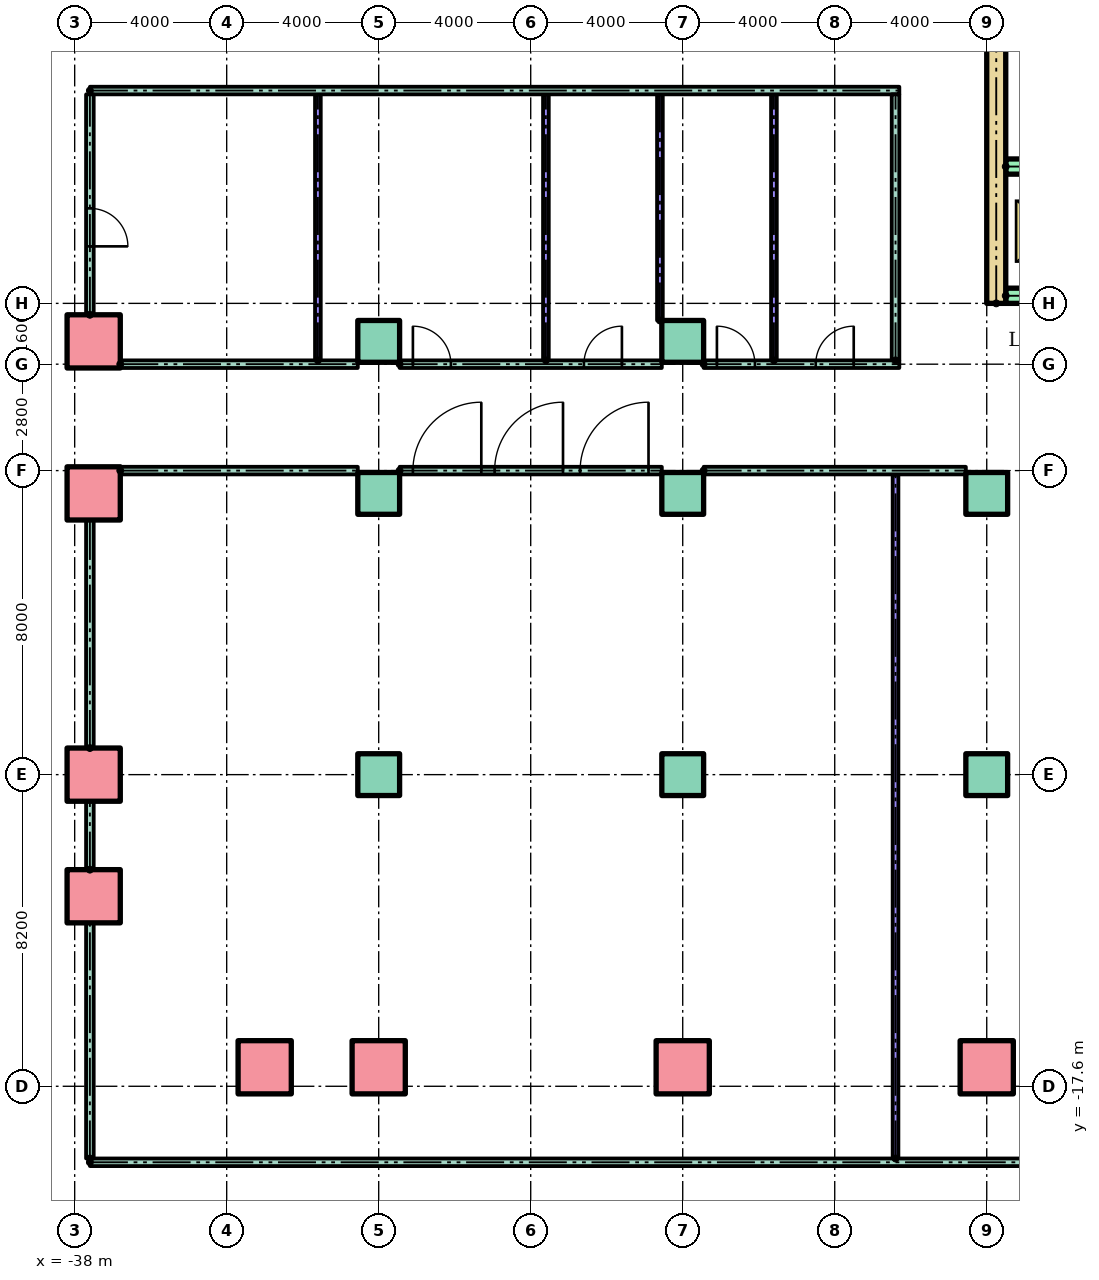
"""IFC4 building model, lengths in metres.
Left out: names, types, materials, properties, quantities, classifications, styles, units other than length and angle.
Written with IfcOpenShell. Run it as: python <this file> out.ifc"""

import sys

from ifc_helpers import new_model, si_unit, direction, frame, frame_2d, origin, origin_2d, place, context, subcontext, project, spatial, rectangle, hollow_rectangle, extrude, element, fill, save


model = new_model("IFC4")
c1 = context("Model", 3, precision=1e-05, world=origin(), true_north=direction((0.0, 1.0)))
c2 = subcontext(c1, "Body", "Model", "MODEL_VIEW")
j1 = project(units=[si_unit("LENGTHUNIT", "METRE"), si_unit("PLANEANGLEUNIT", "RADIAN")], contexts=[c1])
p1 = place(None, origin())
s1 = spatial("IfcSite", under=j1, at=p1, CompositionType="ELEMENT")
p2 = place(p1, origin())
s2 = spatial("IfcBuilding", under=s1, at=p2, CompositionType="ELEMENT")
p3 = place(p2, origin())
s3 = spatial("IfcBuildingStorey", under=s2, at=p3, CompositionType="ELEMENT", Elevation=0.0)
for number, where in (
    (1, (-33.0, -17.1, 0.0)),
    (2, (-30.0, -17.1, 0.0)),
    (3, (-22.0, -17.1, 0.0)),
    (4, (-14.0, -17.1, 0.0)),
    (5, (-37.5, -12.6, 0.0)),
    (6, (-37.5, -9.4, 0.0)),
):
    element("IfcColumn", number, at=place(p3, frame(where)), inside=s3, PredefinedType="COLUMN", context=c2, shape_type="SweptSolid", body=[
        extrude(hollow_rectangle(XDim=1.4, YDim=1.4, WallThickness=0.08, at=origin_2d()), origin(), (0.0, 0.0, 1.0), 6.0),
    ])
for number, where in (
    (7, (-30.0, -9.4, 0.0)),
    (8, (-22.0, -9.4, 0.0)),
    (9, (-14.0, -9.4, 0.0)),
):
    element("IfcColumn", number, at=place(p3, frame(where)), inside=s3, PredefinedType="COLUMN", context=c2, shape_type="SweptSolid", body=[
        extrude(rectangle(XDim=1.1, YDim=1.1, at=origin_2d()), origin(), (0.0, 0.0, 1.0), 6.0),
    ])
p4 = place(p3, frame((-37.5, -2.0, 0.0)))
e10 = element("IfcColumn", 10, at=p4, inside=s3, PredefinedType="COLUMN", context=c2, shape_type="SweptSolid", body=[
    extrude(hollow_rectangle(XDim=1.4, YDim=1.4, WallThickness=0.08, at=origin_2d()), origin(), (0.0, 0.0, 1.0), 6.0),
])
for number, where in (
    (11, (-30.0, -2.0, 0.0)),
    (12, (-22.0, -2.0, 0.0)),
    (13, (-14.0, -2.0, 0.0)),
):
    element("IfcColumn", number, at=place(p3, frame(where)), inside=s3, PredefinedType="COLUMN", context=c2, shape_type="SweptSolid", body=[
        extrude(rectangle(XDim=1.1, YDim=1.1, at=origin_2d()), origin(), (0.0, 0.0, 1.0), 6.0),
    ])
p5 = place(p3, frame((-37.5, 2.0, 0.0)))
e14 = element("IfcColumn", 14, at=p5, inside=s3, PredefinedType="COLUMN", context=c2, shape_type="SweptSolid", body=[
    extrude(hollow_rectangle(XDim=1.4, YDim=1.4, WallThickness=0.08, at=origin_2d()), origin(), (0.0, 0.0, 1.0), 6.0),
])
for number, where in (
    (15, (-30.0, 2.0, 0.0)),
    (16, (-22.0, 2.0, 0.0)),
):
    element("IfcColumn", number, at=place(p3, frame(where)), inside=s3, PredefinedType="COLUMN", context=c2, shape_type="SweptSolid", body=[
        extrude(rectangle(XDim=1.1, YDim=1.1, at=origin_2d()), origin(), (0.0, 0.0, 1.0), 6.0),
    ])
p6 = place(p3, frame((-13.75, 3.0, 0.0), z_axis=(0.0, 0.0, 1.0), x_axis=(0.0, 1.0, 0.0)))
e17 = element("IfcWall", 17, at=p6, inside=s3, PredefinedType="SHEAR", context=c2, shape_type="SweptSolid", body=[
    extrude(rectangle(XDim=17.0, YDim=0.5, at=frame_2d((8.5, 0.0))), origin(), (0.0, 0.0, 1.0), 5.7),
])
p7 = place(p3, frame((-13.5, 3.2, 0.0)))
e18 = element("IfcWall", 18, at=p7, inside=s3, PredefinedType="SHEAR", context=c2, shape_type="SweptSolid", body=[
    extrude(rectangle(XDim=27.0, YDim=0.4, at=frame_2d((13.5, 0.0))), origin(), (0.0, 0.0, 1.0), 5.7),
])
p8 = place(p7, frame((0.772, 0.0, 0.0)))
e19 = element("IfcOpeningElement", 19, at=p8, cuts=e18, PredefinedType="OPENING", context=c2, shape_type="SweptSolid", body=[
    extrude(rectangle(XDim=1.1, YDim=2.1, at=frame_2d((0.55, 1.05))), frame((0.0, 0.21, 0.0), z_axis=(0.0, -1.0, 0.0), x_axis=(1.0, 0.0, 0.0)), (0.0, 0.0, 1.0), 0.42),
])
p9 = place(p7, frame((3.817, 0.0, 0.0)))
e20 = element("IfcOpeningElement", 20, at=p9, cuts=e18, PredefinedType="OPENING", context=c2, shape_type="SweptSolid", body=[
    extrude(rectangle(XDim=1.1, YDim=2.1, at=frame_2d((0.55, 1.05))), frame((0.0, 0.21, 0.0), z_axis=(0.0, -1.0, 0.0), x_axis=(1.0, 0.0, 0.0)), (0.0, 0.0, 1.0), 0.42),
])
p10 = place(p7, frame((6.861, 0.0, 0.0)))
e21 = element("IfcOpeningElement", 21, at=p10, cuts=e18, PredefinedType="OPENING", context=c2, shape_type="SweptSolid", body=[
    extrude(rectangle(XDim=1.1, YDim=2.1, at=frame_2d((0.55, 1.05))), frame((0.0, 0.21, 0.0), z_axis=(0.0, -1.0, 0.0), x_axis=(1.0, 0.0, 0.0)), (0.0, 0.0, 1.0), 0.42),
])
p11 = place(p7, frame((9.906, 0.0, 0.0)))
e22 = element("IfcOpeningElement", 22, at=p11, cuts=e18, PredefinedType="OPENING", context=c2, shape_type="SweptSolid", body=[
    extrude(rectangle(XDim=1.1, YDim=2.1, at=frame_2d((0.55, 1.05))), frame((0.0, 0.21, 0.0), z_axis=(0.0, -1.0, 0.0), x_axis=(1.0, 0.0, 0.0)), (0.0, 0.0, 1.0), 0.42),
])
p12 = place(p7, frame((15.994, 0.0, 0.0)))
e23 = element("IfcOpeningElement", 23, at=p12, cuts=e18, PredefinedType="OPENING", context=c2, shape_type="SweptSolid", body=[
    extrude(rectangle(XDim=1.1, YDim=2.1, at=frame_2d((0.55, 1.05))), frame((0.0, 0.21, 0.0), z_axis=(0.0, -1.0, 0.0), x_axis=(1.0, 0.0, 0.0)), (0.0, 0.0, 1.0), 0.42),
])
p13 = place(p7, frame((19.039, 0.0, 0.0)))
e24 = element("IfcOpeningElement", 24, at=p13, cuts=e18, PredefinedType="OPENING", context=c2, shape_type="SweptSolid", body=[
    extrude(rectangle(XDim=1.1, YDim=2.1, at=frame_2d((0.55, 1.05))), frame((0.0, 0.21, 0.0), z_axis=(0.0, -1.0, 0.0), x_axis=(1.0, 0.0, 0.0)), (0.0, 0.0, 1.0), 0.42),
])
p14 = place(p7, frame((12.6, 0.0, 0.0)))
e25 = element("IfcOpeningElement", 25, at=p14, cuts=e18, PredefinedType="OPENING", context=c2, shape_type="SweptSolid", body=[
    extrude(rectangle(XDim=1.8, YDim=2.1, at=frame_2d((0.9, 1.05))), frame((0.0, 0.21, 0.0), z_axis=(0.0, -1.0, 0.0), x_axis=(1.0, 0.0, 0.0)), (0.0, 0.0, 1.0), 0.42),
])
p15 = place(p3, frame((-13.5, 6.6, 0.0)))
e26 = element("IfcWall", 26, at=p15, inside=s3, PredefinedType="SHEAR", context=c2, shape_type="SweptSolid", body=[
    extrude(rectangle(XDim=11.978, YDim=0.4, at=frame_2d((5.989, 0.0))), origin(), (0.0, 0.0, 1.0), 5.7),
])
p16 = place(p3, frame((-37.6, -19.6, 0.0)))
e27 = element("IfcWall", 27, at=p16, inside=s3, PredefinedType="PARTITIONING", context=c2, shape_type="SweptSolid", body=[
    extrude(rectangle(XDim=75.2, YDim=0.2, at=frame_2d((37.6, 0.0))), origin(), (0.0, 0.0, 1.0), 5.7),
])
p17 = place(p16, frame((26.204, 0.0, 0.0)))
e28 = element("IfcOpeningElement", 28, at=p17, cuts=e27, PredefinedType="OPENING", context=c2, shape_type="SweptSolid", body=[
    extrude(rectangle(XDim=1.8, YDim=2.1, at=frame_2d((0.9, 1.05))), frame((0.0, 0.11, 0.0), z_axis=(0.0, -1.0, 0.0), x_axis=(1.0, 0.0, 0.0)), (0.0, 0.0, 1.0), 0.22),
])
p18 = place(p16, frame((36.7, 0.0, 0.0)))
e29 = element("IfcOpeningElement", 29, at=p18, cuts=e27, PredefinedType="OPENING", context=c2, shape_type="SweptSolid", body=[
    extrude(rectangle(XDim=1.8, YDim=2.1, at=frame_2d((0.9, 1.05))), frame((0.0, 0.11, 0.0), z_axis=(0.0, -1.0, 0.0), x_axis=(1.0, 0.0, 0.0)), (0.0, 0.0, 1.0), 0.22),
])
p19 = place(p16, frame((47.196, 0.0, 0.0)))
e30 = element("IfcOpeningElement", 30, at=p19, cuts=e27, PredefinedType="OPENING", context=c2, shape_type="SweptSolid", body=[
    extrude(rectangle(XDim=1.8, YDim=2.1, at=frame_2d((0.9, 1.05))), frame((0.0, 0.11, 0.0), z_axis=(0.0, -1.0, 0.0), x_axis=(1.0, 0.0, 0.0)), (0.0, 0.0, 1.0), 0.22),
])
p20 = place(p3, frame((-36.8, -1.4, 0.0)))
e31 = element("IfcWall", 31, at=p20, inside=s3, PredefinedType="PARTITIONING", context=c2, shape_type="SweptSolid", body=[
    extrude(rectangle(XDim=6.25, YDim=0.2, at=frame_2d((3.125, 0.0))), origin(), (0.0, 0.0, 1.0), 5.7),
])
p21 = place(p3, frame((-29.45, -1.4, 0.0)))
e32 = element("IfcWall", 32, at=p21, inside=s3, PredefinedType="PARTITIONING", context=c2, shape_type="SweptSolid", body=[
    extrude(rectangle(XDim=6.9, YDim=0.2, at=frame_2d((3.45, 0.0))), origin(), (0.0, 0.0, 1.0), 5.7),
])
p22 = place(p21, frame((0.35, 0.0, 0.0)))
e33 = element("IfcOpeningElement", 33, at=p22, cuts=e32, PredefinedType="OPENING", context=c2, shape_type="SweptSolid", body=[
    extrude(rectangle(XDim=1.8, YDim=2.1, at=frame_2d((0.9, 1.05))), frame((0.0, 0.11, 0.0), z_axis=(0.0, -1.0, 0.0), x_axis=(1.0, 0.0, 0.0)), (0.0, 0.0, 1.0), 0.22),
])
p23 = place(p21, frame((2.5, 0.0, 0.0)))
e34 = element("IfcOpeningElement", 34, at=p23, cuts=e32, PredefinedType="OPENING", context=c2, shape_type="SweptSolid", body=[
    extrude(rectangle(XDim=1.8, YDim=2.1, at=frame_2d((0.9, 1.05))), frame((0.0, 0.11, 0.0), z_axis=(0.0, -1.0, 0.0), x_axis=(1.0, 0.0, 0.0)), (0.0, 0.0, 1.0), 0.22),
])
p24 = place(p21, frame((4.75, 0.0, 0.0)))
e35 = element("IfcOpeningElement", 35, at=p24, cuts=e32, PredefinedType="OPENING", context=c2, shape_type="SweptSolid", body=[
    extrude(rectangle(XDim=1.8, YDim=2.1, at=frame_2d((0.9, 1.05))), frame((0.0, 0.11, 0.0), z_axis=(0.0, -1.0, 0.0), x_axis=(1.0, 0.0, 0.0)), (0.0, 0.0, 1.0), 0.22),
])
p25 = place(p3, frame((-21.45, -1.4, 0.0)))
e36 = element("IfcWall", 36, at=p25, inside=s3, PredefinedType="PARTITIONING", context=c2, shape_type="SweptSolid", body=[
    extrude(rectangle(XDim=6.9, YDim=0.2, at=frame_2d((3.45, 0.0))), origin(), (0.0, 0.0, 1.0), 5.7),
])
p26 = place(p3, frame((-36.8, 1.4, 0.0)))
e37 = element("IfcWall", 37, at=p26, inside=s3, PredefinedType="PARTITIONING", context=c2, shape_type="SweptSolid", body=[
    extrude(rectangle(XDim=6.25, YDim=0.2, at=frame_2d((3.125, 0.0))), origin(), (0.0, 0.0, 1.0), 5.7),
])
p27 = place(p3, frame((-29.45, 1.4, 0.0)))
e38 = element("IfcWall", 38, at=p27, inside=s3, PredefinedType="PARTITIONING", context=c2, shape_type="SweptSolid", body=[
    extrude(rectangle(XDim=6.9, YDim=0.2, at=frame_2d((3.45, 0.0))), origin(), (0.0, 0.0, 1.0), 5.7),
])
p28 = place(p27, frame((0.35, 0.0, 0.0)))
e39 = element("IfcOpeningElement", 39, at=p28, cuts=e38, PredefinedType="OPENING", context=c2, shape_type="SweptSolid", body=[
    extrude(rectangle(XDim=1.0, YDim=2.1, at=frame_2d((0.5, 1.05))), frame((0.0, 0.11, 0.0), z_axis=(0.0, -1.0, 0.0), x_axis=(1.0, 0.0, 0.0)), (0.0, 0.0, 1.0), 0.22),
])
p29 = place(p27, frame((4.85, 0.0, 0.0)))
e40 = element("IfcOpeningElement", 40, at=p29, cuts=e38, PredefinedType="OPENING", context=c2, shape_type="SweptSolid", body=[
    extrude(rectangle(XDim=1.0, YDim=2.1, at=frame_2d((0.5, 1.05))), frame((0.0, 0.11, 0.0), z_axis=(0.0, -1.0, 0.0), x_axis=(1.0, 0.0, 0.0)), (0.0, 0.0, 1.0), 0.22),
])
p30 = place(p3, frame((-21.45, 1.4, 0.0)))
e41 = element("IfcWall", 41, at=p30, inside=s3, PredefinedType="PARTITIONING", context=c2, shape_type="SweptSolid", body=[
    extrude(rectangle(XDim=5.15, YDim=0.2, at=frame_2d((2.575, 0.0))), origin(), (0.0, 0.0, 1.0), 5.7),
])
p31 = place(p30, frame((0.35, 0.0, 0.0)))
e42 = element("IfcOpeningElement", 42, at=p31, cuts=e41, PredefinedType="OPENING", context=c2, shape_type="SweptSolid", body=[
    extrude(rectangle(XDim=1.0, YDim=2.1, at=frame_2d((0.5, 1.05))), frame((0.0, 0.11, 0.0), z_axis=(0.0, -1.0, 0.0), x_axis=(1.0, 0.0, 0.0)), (0.0, 0.0, 1.0), 0.22),
])
p32 = place(p30, frame((2.95, 0.0, 0.0)))
e43 = element("IfcOpeningElement", 43, at=p32, cuts=e41, PredefinedType="OPENING", context=c2, shape_type="SweptSolid", body=[
    extrude(rectangle(XDim=1.0, YDim=2.1, at=frame_2d((0.5, 1.05))), frame((0.0, 0.11, 0.0), z_axis=(0.0, -1.0, 0.0), x_axis=(1.0, 0.0, 0.0)), (0.0, 0.0, 1.0), 0.22),
])
p33 = place(p3, frame((-37.6, 8.6, 0.0)))
e44 = element("IfcWall", 44, at=p33, inside=s3, PredefinedType="PARTITIONING", context=c2, shape_type="SweptSolid", body=[
    extrude(rectangle(XDim=21.3, YDim=0.2, at=frame_2d((10.65, 0.0))), origin(), (0.0, 0.0, 1.0), 5.7),
])
p34 = place(p3, frame((-37.6, -19.5, 0.0), z_axis=(0.0, 0.0, 1.0), x_axis=(0.0, 1.0, 0.0)))
e45 = element("IfcWall", 45, at=p34, inside=s3, PredefinedType="PARTITIONING", context=c2, shape_type="SweptSolid", body=[
    extrude(rectangle(XDim=6.2, YDim=0.2, at=frame_2d((3.1, 0.0))), origin(), (0.0, 0.0, 1.0), 5.7),
])
p35 = place(p3, frame((-37.6, -11.9, 0.0), z_axis=(0.0, 0.0, 1.0), x_axis=(0.0, 1.0, 0.0)))
e46 = element("IfcWall", 46, at=p35, inside=s3, PredefinedType="PARTITIONING", context=c2, shape_type="SweptSolid", body=[
    extrude(rectangle(XDim=1.8, YDim=0.2, at=frame_2d((0.9, 0.0))), origin(), (0.0, 0.0, 1.0), 5.7),
])
p36 = place(p3, frame((-37.6, -8.7, 0.0), z_axis=(0.0, 0.0, 1.0), x_axis=(0.0, 1.0, 0.0)))
e47 = element("IfcWall", 47, at=p36, inside=s3, PredefinedType="PARTITIONING", context=c2, shape_type="SweptSolid", body=[
    extrude(rectangle(XDim=6.0, YDim=0.2, at=frame_2d((3.0, 0.0))), origin(), (0.0, 0.0, 1.0), 5.7),
])
p37 = place(p3, frame((-37.6, 2.7, 0.0), z_axis=(0.0, 0.0, 1.0), x_axis=(0.0, 1.0, 0.0)))
e48 = element("IfcWall", 48, at=p37, inside=s3, PredefinedType="PARTITIONING", context=c2, shape_type="SweptSolid", body=[
    extrude(rectangle(XDim=5.8, YDim=0.2, at=frame_2d((2.9, 0.0))), origin(), (0.0, 0.0, 1.0), 5.7),
])
p38 = place(p37, frame((1.8, 0.0, 0.0)))
e49 = element("IfcOpeningElement", 49, at=p38, cuts=e48, PredefinedType="OPENING", context=c2, shape_type="SweptSolid", body=[
    extrude(rectangle(XDim=1.0, YDim=2.1, at=frame_2d((0.5, 1.05))), frame((0.0, 0.11, 0.0), z_axis=(0.0, -1.0, 0.0), x_axis=(1.0, 0.0, 0.0)), (0.0, 0.0, 1.0), 0.22),
])
for number, where, z_axis, x_axis in (
    (50, (-31.6, 1.5, 0.0), (0.0, 0.0, 1.0), (0.0, 1.0, 0.0)),
    (51, (-25.6, 1.5, 0.0), (0.0, 0.0, 1.0), (0.0, 1.0, 0.0)),
):
    element("IfcWall", number, at=place(p3, frame(where, z_axis=z_axis, x_axis=x_axis)), inside=s3, PredefinedType="PARTITIONING", context=c2, shape_type="SweptSolid", body=[
        extrude(rectangle(XDim=7.0, YDim=0.15, at=frame_2d((3.5, 0.0))), origin(), (0.0, 0.0, 1.0), 5.7),
    ])
p39 = place(p3, frame((-22.6, 2.55, 0.0), z_axis=(0.0, 0.0, 1.0), x_axis=(0.0, 1.0, 0.0)))
e52 = element("IfcWall", 52, at=p39, inside=s3, PredefinedType="PARTITIONING", context=c2, shape_type="SweptSolid", body=[
    extrude(rectangle(XDim=5.95, YDim=0.15, at=frame_2d((2.975, 0.0))), origin(), (0.0, 0.0, 1.0), 5.7),
])
p40 = place(p3, frame((-19.6, 1.5, 0.0), z_axis=(0.0, 0.0, 1.0), x_axis=(0.0, 1.0, 0.0)))
e53 = element("IfcWall", 53, at=p40, inside=s3, PredefinedType="PARTITIONING", context=c2, shape_type="SweptSolid", body=[
    extrude(rectangle(XDim=7.0, YDim=0.15, at=frame_2d((3.5, 0.0))), origin(), (0.0, 0.0, 1.0), 5.7),
])
p41 = place(p3, frame((-16.4, 1.5, 0.0), z_axis=(0.0, 0.0, 1.0), x_axis=(0.0, 1.0, 0.0)))
e54 = element("IfcWall", 54, at=p41, inside=s3, PredefinedType="PARTITIONING", context=c2, shape_type="SweptSolid", body=[
    extrude(rectangle(XDim=7.0, YDim=0.2, at=frame_2d((3.5, 0.0))), origin(), (0.0, 0.0, 1.0), 5.7),
])
p42 = place(p3, frame((-16.4, -19.5, 0.0), z_axis=(0.0, 0.0, 1.0), x_axis=(0.0, 1.0, 0.0)))
e55 = element("IfcWall", 55, at=p42, inside=s3, PredefinedType="PARTITIONING", context=c2, shape_type="SweptSolid", body=[
    extrude(rectangle(XDim=18.0, YDim=0.15, at=frame_2d((9.0, 0.0))), origin(), (0.0, 0.0, 1.0), 5.7),
])
p43 = place(p38, frame((1.0, 0.0, 0.0), z_axis=(0.0, 0.0, 1.0), x_axis=(-1.0, 0.0, 0.0)))
e56 = element("IfcDoor", 56, at=p43, inside=s3, OperationType="SINGLE_SWING_LEFT", PredefinedType="DOOR", context=c2, shape_type="SweptSolid", body=[
    extrude(rectangle(XDim=1.0, YDim=2.1, at=frame_2d((0.5, 1.05))), frame((0.0, 0.025, 0.0), z_axis=(0.0, -1.0, 0.0), x_axis=(1.0, 0.0, 0.0)), (0.0, 0.0, 1.0), 0.05),
])
fill(e49, e56)
p44 = place(p28, origin())
e57 = element("IfcDoor", 57, at=p44, inside=s3, OperationType="SINGLE_SWING_LEFT", PredefinedType="DOOR", context=c2, shape_type="SweptSolid", body=[
    extrude(rectangle(XDim=1.0, YDim=2.1, at=frame_2d((0.5, 1.05))), frame((0.0, 0.025, 0.0), z_axis=(0.0, -1.0, 0.0), x_axis=(1.0, 0.0, 0.0)), (0.0, 0.0, 1.0), 0.05),
])
fill(e39, e57)
p45 = place(p29, origin())
e58 = element("IfcDoor", 58, at=p45, inside=s3, OperationType="SINGLE_SWING_RIGHT", PredefinedType="DOOR", context=c2, shape_type="SweptSolid", body=[
    extrude(rectangle(XDim=1.0, YDim=2.1, at=frame_2d((0.5, 1.05))), frame((0.0, 0.025, 0.0), z_axis=(0.0, -1.0, 0.0), x_axis=(1.0, 0.0, 0.0)), (0.0, 0.0, 1.0), 0.05),
])
fill(e40, e58)
p46 = place(p31, origin())
e59 = element("IfcDoor", 59, at=p46, inside=s3, OperationType="SINGLE_SWING_LEFT", PredefinedType="DOOR", context=c2, shape_type="SweptSolid", body=[
    extrude(rectangle(XDim=1.0, YDim=2.1, at=frame_2d((0.5, 1.05))), frame((0.0, 0.025, 0.0), z_axis=(0.0, -1.0, 0.0), x_axis=(1.0, 0.0, 0.0)), (0.0, 0.0, 1.0), 0.05),
])
fill(e42, e59)
p47 = place(p32, origin())
e60 = element("IfcDoor", 60, at=p47, inside=s3, OperationType="SINGLE_SWING_RIGHT", PredefinedType="DOOR", context=c2, shape_type="SweptSolid", body=[
    extrude(rectangle(XDim=1.0, YDim=2.1, at=frame_2d((0.5, 1.05))), frame((0.0, 0.025, 0.0), z_axis=(0.0, -1.0, 0.0), x_axis=(1.0, 0.0, 0.0)), (0.0, 0.0, 1.0), 0.05),
])
fill(e43, e60)
p48 = place(p22, origin())
e61 = element("IfcDoor", 61, at=p48, inside=s3, OperationType="DOUBLE_DOOR_SINGLE_SWING", PredefinedType="DOOR", context=c2, shape_type="SweptSolid", body=[
    extrude(rectangle(XDim=1.8, YDim=2.1, at=frame_2d((0.9, 1.05))), frame((0.0, 0.025, 0.0), z_axis=(0.0, -1.0, 0.0), x_axis=(1.0, 0.0, 0.0)), (0.0, 0.0, 1.0), 0.05),
])
fill(e33, e61)
p49 = place(p23, origin())
e62 = element("IfcDoor", 62, at=p49, inside=s3, OperationType="DOUBLE_DOOR_SINGLE_SWING", PredefinedType="DOOR", context=c2, shape_type="SweptSolid", body=[
    extrude(rectangle(XDim=1.8, YDim=2.1, at=frame_2d((0.9, 1.05))), frame((0.0, 0.025, 0.0), z_axis=(0.0, -1.0, 0.0), x_axis=(1.0, 0.0, 0.0)), (0.0, 0.0, 1.0), 0.05),
])
fill(e34, e62)
p50 = place(p24, origin())
e63 = element("IfcDoor", 63, at=p50, inside=s3, OperationType="DOUBLE_DOOR_SINGLE_SWING", PredefinedType="DOOR", context=c2, shape_type="SweptSolid", body=[
    extrude(rectangle(XDim=1.8, YDim=2.1, at=frame_2d((0.9, 1.05))), frame((0.0, 0.025, 0.0), z_axis=(0.0, -1.0, 0.0), x_axis=(1.0, 0.0, 0.0)), (0.0, 0.0, 1.0), 0.05),
])
fill(e35, e63)
save(model, sys.argv[1])
